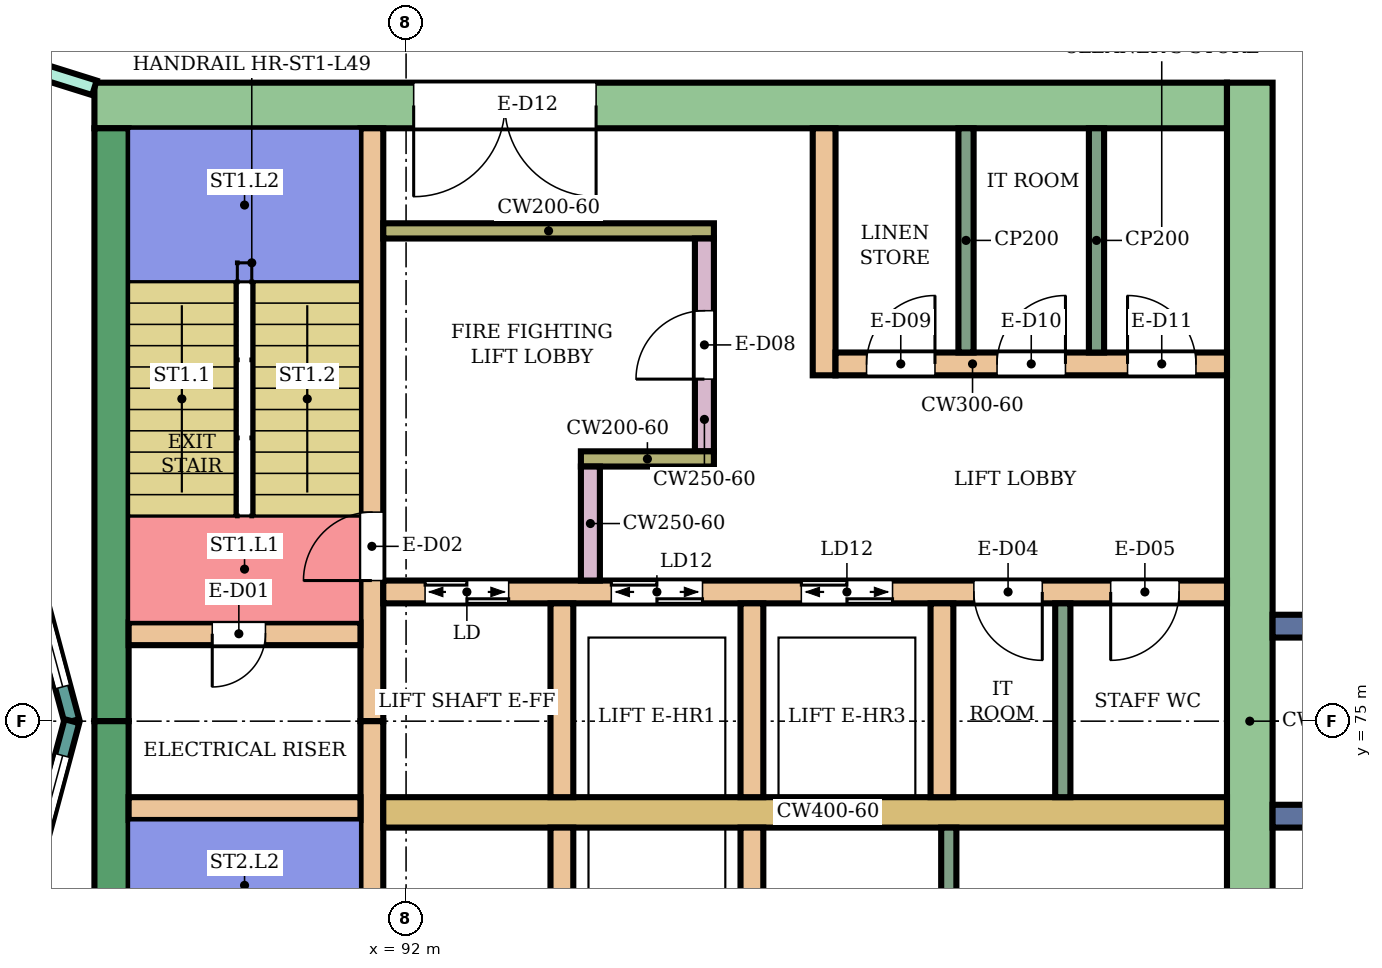
"""IFC4 building model, lengths in metres.
Left out: names, types, materials, properties, quantities, classifications, styles, units other than length and angle.
Written with IfcOpenShell. Run it as: python <this file> out.ifc"""

import sys

from ifc_helpers import new_model, si_unit, direction, frame, frame_2d, origin, place, context, subcontext, project, spatial, rectangle, extrude, element, fill, save


model = new_model("IFC4")
c1 = context("Model", 3, precision=1e-05, world=origin(), true_north=direction((0.0, 1.0)))
c2 = subcontext(c1, "Body", "Model", "MODEL_VIEW")
j1 = project(units=[si_unit("LENGTHUNIT", "METRE"), si_unit("PLANEANGLEUNIT", "RADIAN")], contexts=[c1])
p1 = place(None, origin())
s1 = spatial("IfcSite", under=j1, at=p1, CompositionType="ELEMENT")
p2 = place(p1, origin())
s2 = spatial("IfcBuilding", under=s1, at=p2, CompositionType="ELEMENT")
p3 = place(p2, frame((0.0, 0.0, 212.5)))
s3 = spatial("IfcBuildingStorey", under=s2, at=p3, CompositionType="ELEMENT", Elevation=212.5)
p4 = place(p3, frame((87.9, 83.1, 0.0), z_axis=(0.0, 0.0, 1.0), x_axis=(1.0, 0.0, 0.0)))
e1 = element("IfcWall", 1, at=p4, inside=s3, PredefinedType="SHEAR", context=c2, shape_type="SweptSolid", body=[
    extrude(rectangle(XDim=14.9, YDim=0.6, at=frame_2d((7.45, 0.0))), origin(), (0.0, 0.0, 1.0), 3.88),
])
p5 = place(p4, frame((4.2, 0.0, 0.0)))
e2 = element("IfcOpeningElement", 2, at=p5, cuts=e1, PredefinedType="OPENING", context=c2, shape_type="SweptSolid", body=[
    extrude(rectangle(XDim=2.4, YDim=2.4, at=frame_2d((1.2, 1.2))), frame((0.0, 0.31, 0.0), z_axis=(0.0, -1.0, 0.0), x_axis=(1.0, 0.0, 0.0)), (0.0, 0.0, 1.0), 0.62),
])
for number, where, z_axis, x_axis in (
    (3, (88.125, 75.0, 0.0), (0.0, 0.0, 1.0), (0.0, 1.0, 0.0)),
    (4, (88.125, 67.2, 0.0), (0.0, 0.0, 1.0), (0.0, 1.0, 0.0)),
):
    element("IfcWall", number, at=place(p3, frame(where, z_axis=z_axis, x_axis=x_axis)), inside=s3, PredefinedType="SHEAR", context=c2, shape_type="SweptSolid", body=[
        extrude(rectangle(XDim=7.8, YDim=0.45, at=frame_2d((3.9, 0.0))), origin(), (0.0, 0.0, 1.0), 3.88),
    ])
p6 = place(p3, frame((103.1, 66.6, 0.0), z_axis=(0.0, 0.0, 1.0), x_axis=(0.0, 1.0, 0.0)))
e5 = element("IfcWall", 5, at=p6, inside=s3, PredefinedType="SHEAR", context=c2, shape_type="SweptSolid", body=[
    extrude(rectangle(XDim=16.8, YDim=0.6, at=frame_2d((8.4, 0.0))), origin(), (0.0, 0.0, 1.0), 3.88),
])
p7 = place(p3, frame((91.55, 75.0, 0.0), z_axis=(0.0, 0.0, 1.0), x_axis=(0.0, 1.0, 0.0)))
e6 = element("IfcWall", 6, at=p7, inside=s3, PredefinedType="SHEAR", context=c2, shape_type="SweptSolid", body=[
    extrude(rectangle(XDim=7.8, YDim=0.3, at=frame_2d((3.9, 0.0))), origin(), (0.0, 0.0, 1.0), 3.88),
])
p8 = place(p7, frame((1.85, 0.0, 0.0)))
e7 = element("IfcOpeningElement", 7, at=p8, cuts=e6, PredefinedType="OPENING", context=c2, shape_type="SweptSolid", body=[
    extrude(rectangle(XDim=0.9, YDim=2.1, at=frame_2d((0.45, 1.05))), frame((0.0, 0.16, 0.0), z_axis=(0.0, -1.0, 0.0), x_axis=(1.0, 0.0, 0.0)), (0.0, 0.0, 1.0), 0.32),
])
p9 = place(p3, frame((91.55, 67.2, 0.0), z_axis=(0.0, 0.0, 1.0), x_axis=(0.0, 1.0, 0.0)))
e8 = element("IfcWall", 8, at=p9, inside=s3, PredefinedType="SHEAR", context=c2, shape_type="SweptSolid", body=[
    extrude(rectangle(XDim=7.8, YDim=0.3, at=frame_2d((3.9, 0.0))), origin(), (0.0, 0.0, 1.0), 3.88),
])
p10 = place(p9, frame((0.45, 0.0, 0.0)))
e9 = element("IfcOpeningElement", 9, at=p10, cuts=e8, PredefinedType="OPENING", context=c2, shape_type="SweptSolid", body=[
    extrude(rectangle(XDim=0.9, YDim=2.1, at=frame_2d((0.45, 1.05))), frame((0.0, 0.16, 0.0), z_axis=(0.0, -1.0, 0.0), x_axis=(1.0, 0.0, 0.0)), (0.0, 0.0, 1.0), 0.32),
])
p11 = place(p3, frame((88.35, 76.15, 0.0), z_axis=(0.0, 0.0, 1.0), x_axis=(1.0, 0.0, 0.0)))
e10 = element("IfcWall", 10, at=p11, inside=s3, PredefinedType="SHEAR", context=c2, shape_type="SweptSolid", body=[
    extrude(rectangle(XDim=3.05, YDim=0.3, at=frame_2d((1.525, 0.0))), origin(), (0.0, 0.0, 1.0), 3.88),
])
p12 = place(p11, frame((1.1, 0.0, 0.0)))
e11 = element("IfcOpeningElement", 11, at=p12, cuts=e10, PredefinedType="OPENING", context=c2, shape_type="SweptSolid", body=[
    extrude(rectangle(XDim=0.7, YDim=2.0, at=frame_2d((0.35, 1.0))), frame((0.0, 0.16, 0.0), z_axis=(0.0, -1.0, 0.0), x_axis=(1.0, 0.0, 0.0)), (0.0, 0.0, 1.0), 0.32),
])
p13 = place(p3, frame((88.35, 73.85, 0.0), z_axis=(0.0, 0.0, 1.0), x_axis=(1.0, 0.0, 0.0)))
e12 = element("IfcWall", 12, at=p13, inside=s3, PredefinedType="SHEAR", context=c2, shape_type="SweptSolid", body=[
    extrude(rectangle(XDim=3.05, YDim=0.3, at=frame_2d((1.525, 0.0))), origin(), (0.0, 0.0, 1.0), 3.88),
])
p14 = place(p3, frame((91.7, 76.7, 0.0), z_axis=(0.0, 0.0, 1.0), x_axis=(1.0, 0.0, 0.0)))
e13 = element("IfcWall", 13, at=p14, inside=s3, PredefinedType="SHEAR", context=c2, shape_type="SweptSolid", body=[
    extrude(rectangle(XDim=11.1, YDim=0.3, at=frame_2d((5.55, 0.0))), origin(), (0.0, 0.0, 1.0), 3.88),
])
p15 = place(p14, frame((0.55, 0.0, 0.0)))
e14 = element("IfcOpeningElement", 14, at=p15, cuts=e13, PredefinedType="OPENING", context=c2, shape_type="SweptSolid", body=[
    extrude(rectangle(XDim=1.1, YDim=2.1, at=frame_2d((0.55, 1.05))), frame((0.0, 0.16, 0.0), z_axis=(0.0, -1.0, 0.0), x_axis=(1.0, 0.0, 0.0)), (0.0, 0.0, 1.0), 0.32),
])
p16 = place(p14, frame((3.0, 0.0, 0.0)))
e15 = element("IfcOpeningElement", 15, at=p16, cuts=e13, PredefinedType="OPENING", context=c2, shape_type="SweptSolid", body=[
    extrude(rectangle(XDim=1.2, YDim=2.1, at=frame_2d((0.6, 1.05))), frame((0.0, 0.16, 0.0), z_axis=(0.0, -1.0, 0.0), x_axis=(1.0, 0.0, 0.0)), (0.0, 0.0, 1.0), 0.32),
])
p17 = place(p14, frame((5.5, 0.0, 0.0)))
e16 = element("IfcOpeningElement", 16, at=p17, cuts=e13, PredefinedType="OPENING", context=c2, shape_type="SweptSolid", body=[
    extrude(rectangle(XDim=1.2, YDim=2.1, at=frame_2d((0.6, 1.05))), frame((0.0, 0.16, 0.0), z_axis=(0.0, -1.0, 0.0), x_axis=(1.0, 0.0, 0.0)), (0.0, 0.0, 1.0), 0.32),
])
p18 = place(p14, frame((7.77, 0.0, 0.0)))
e17 = element("IfcOpeningElement", 17, at=p18, cuts=e13, PredefinedType="OPENING", context=c2, shape_type="SweptSolid", body=[
    extrude(rectangle(XDim=0.9, YDim=2.1, at=frame_2d((0.45, 1.05))), frame((0.0, 0.16, 0.0), z_axis=(0.0, -1.0, 0.0), x_axis=(1.0, 0.0, 0.0)), (0.0, 0.0, 1.0), 0.32),
])
p19 = place(p14, frame((9.57, 0.0, 0.0)))
e18 = element("IfcOpeningElement", 18, at=p19, cuts=e13, PredefinedType="OPENING", context=c2, shape_type="SweptSolid", body=[
    extrude(rectangle(XDim=0.9, YDim=2.1, at=frame_2d((0.45, 1.05))), frame((0.0, 0.16, 0.0), z_axis=(0.0, -1.0, 0.0), x_axis=(1.0, 0.0, 0.0)), (0.0, 0.0, 1.0), 0.32),
])
p20 = place(p3, frame((91.7, 73.8, 0.0), z_axis=(0.0, 0.0, 1.0), x_axis=(1.0, 0.0, 0.0)))
e19 = element("IfcWall", 19, at=p20, inside=s3, PredefinedType="SHEAR", context=c2, shape_type="SweptSolid", body=[
    extrude(rectangle(XDim=11.1, YDim=0.4, at=frame_2d((5.55, 0.0))), origin(), (0.0, 0.0, 1.0), 3.88),
])
for number, where, z_axis, x_axis in (
    (20, (94.05, 74.0, 0.0), (0.0, 0.0, 1.0), (0.0, 1.0, 0.0)),
    (21, (96.55, 74.0, 0.0), (0.0, 0.0, 1.0), (0.0, 1.0, 0.0)),
    (22, (99.05, 74.0, 0.0), (0.0, 0.0, 1.0), (0.0, 1.0, 0.0)),
    (23, (94.05, 71.05, 0.0), (0.0, 0.0, 1.0), (0.0, 1.0, 0.0)),
    (24, (96.55, 71.05, 0.0), (0.0, 0.0, 1.0), (0.0, 1.0, 0.0)),
):
    element("IfcWall", number, at=place(p3, frame(where, z_axis=z_axis, x_axis=x_axis)), inside=s3, PredefinedType="SHEAR", context=c2, shape_type="SweptSolid", body=[
        extrude(rectangle(XDim=2.55, YDim=0.3, at=frame_2d((1.275, 0.0))), origin(), (0.0, 0.0, 1.0), 3.88),
    ])
p21 = place(p3, frame((91.7, 81.45, 0.0), z_axis=(0.0, 0.0, 1.0), x_axis=(1.0, 0.0, 0.0)))
e25 = element("IfcWall", 25, at=p21, inside=s3, PredefinedType="SHEAR", context=c2, shape_type="SweptSolid", body=[
    extrude(rectangle(XDim=4.35, YDim=0.2, at=frame_2d((2.175, 0.0))), origin(), (0.0, 0.0, 1.0), 3.88),
])
p22 = place(p3, frame((95.925, 78.55, 0.0), z_axis=(0.0, 0.0, 1.0), x_axis=(0.0, 1.0, 0.0)))
e26 = element("IfcWall", 26, at=p22, inside=s3, PredefinedType="SHEAR", context=c2, shape_type="SweptSolid", body=[
    extrude(rectangle(XDim=2.8, YDim=0.25, at=frame_2d((1.4, 0.0))), origin(), (0.0, 0.0, 1.0), 3.88),
])
p23 = place(p22, frame((0.95, 0.0, 0.0)))
e27 = element("IfcOpeningElement", 27, at=p23, cuts=e26, PredefinedType="OPENING", context=c2, shape_type="SweptSolid", body=[
    extrude(rectangle(XDim=0.9, YDim=2.1, at=frame_2d((0.45, 1.05))), frame((0.0, 0.135, 0.0), z_axis=(0.0, -1.0, 0.0), x_axis=(1.0, 0.0, 0.0)), (0.0, 0.0, 1.0), 0.27),
])
p24 = place(p3, frame((94.3, 78.45, 0.0), z_axis=(0.0, 0.0, 1.0), x_axis=(1.0, 0.0, 0.0)))
e28 = element("IfcWall", 28, at=p24, inside=s3, PredefinedType="SHEAR", context=c2, shape_type="SweptSolid", body=[
    extrude(rectangle(XDim=1.75, YDim=0.2, at=frame_2d((0.875, 0.0))), origin(), (0.0, 0.0, 1.0), 3.88),
])
p25 = place(p3, frame((94.425, 76.85, 0.0), z_axis=(0.0, 0.0, 1.0), x_axis=(0.0, 1.0, 0.0)))
e29 = element("IfcWall", 29, at=p25, inside=s3, PredefinedType="SHEAR", context=c2, shape_type="SweptSolid", body=[
    extrude(rectangle(XDim=1.5, YDim=0.25, at=frame_2d((0.75, 0.0))), origin(), (0.0, 0.0, 1.0), 3.88),
])
p26 = place(p3, frame((97.5, 79.55, 0.0), z_axis=(0.0, 0.0, 1.0), x_axis=(0.0, 1.0, 0.0)))
e30 = element("IfcWall", 30, at=p26, inside=s3, PredefinedType="SHEAR", context=c2, shape_type="SweptSolid", body=[
    extrude(rectangle(XDim=3.25, YDim=0.3, at=frame_2d((1.625, 0.0))), origin(), (0.0, 0.0, 1.0), 3.88),
])
p27 = place(p3, frame((97.65, 79.7, 0.0), z_axis=(0.0, 0.0, 1.0), x_axis=(1.0, 0.0, 0.0)))
e31 = element("IfcWall", 31, at=p27, inside=s3, PredefinedType="SHEAR", context=c2, shape_type="SweptSolid", body=[
    extrude(rectangle(XDim=5.15, YDim=0.3, at=frame_2d((2.575, 0.0))), origin(), (0.0, 0.0, 1.0), 3.88),
])
p28 = place(p27, frame((0.408, 0.0, 0.0)))
e32 = element("IfcOpeningElement", 32, at=p28, cuts=e31, PredefinedType="OPENING", context=c2, shape_type="SweptSolid", body=[
    extrude(rectangle(XDim=0.9, YDim=2.1, at=frame_2d((0.45, 1.05))), frame((0.0, 0.16, 0.0), z_axis=(0.0, -1.0, 0.0), x_axis=(1.0, 0.0, 0.0)), (0.0, 0.0, 1.0), 0.32),
])
p29 = place(p27, frame((2.125, 0.0, 0.0)))
e33 = element("IfcOpeningElement", 33, at=p29, cuts=e31, PredefinedType="OPENING", context=c2, shape_type="SweptSolid", body=[
    extrude(rectangle(XDim=0.9, YDim=2.1, at=frame_2d((0.45, 1.05))), frame((0.0, 0.16, 0.0), z_axis=(0.0, -1.0, 0.0), x_axis=(1.0, 0.0, 0.0)), (0.0, 0.0, 1.0), 0.32),
])
p30 = place(p27, frame((3.842, 0.0, 0.0)))
e34 = element("IfcOpeningElement", 34, at=p30, cuts=e31, PredefinedType="OPENING", context=c2, shape_type="SweptSolid", body=[
    extrude(rectangle(XDim=0.9, YDim=2.1, at=frame_2d((0.45, 1.05))), frame((0.0, 0.16, 0.0), z_axis=(0.0, -1.0, 0.0), x_axis=(1.0, 0.0, 0.0)), (0.0, 0.0, 1.0), 0.32),
])
for number, where, z_axis, x_axis in (
    (35, (103.4, 73.75, 0.0), (0.0, 0.0, 1.0), (1.0, 0.0, 0.0)),
    (36, (103.4, 76.25, 0.0), (0.0, 0.0, 1.0), (1.0, 0.0, 0.0)),
):
    element("IfcWall", number, at=place(p3, frame(where, z_axis=z_axis, x_axis=x_axis)), inside=s3, PredefinedType="NOTDEFINED", context=c2, shape_type="SweptSolid", body=[
        extrude(rectangle(XDim=2.416, YDim=0.3, at=frame_2d((1.208, 0.0))), origin(), (0.0, 0.0, 1.0), 4.2),
    ])
p31 = place(p3, frame((87.604, 75.0, 0.0), z_axis=(0.0, 0.0, 1.0), x_axis=(-0.258789828301, 0.965933654434, 0.0)))
e37 = element("IfcWall", 37, at=p31, inside=s3, PredefinedType="NOTDEFINED", context=c2, shape_type="SweptSolid", body=[
    extrude(rectangle(XDim=3.936, YDim=0.2, at=frame_2d((1.968, 0.0))), origin(), (0.0, 0.0, 1.0), 4.2),
])
p32 = place(p31, frame((0.468, 0.0, 0.9)))
e38 = element("IfcOpeningElement", 38, at=p32, cuts=e37, PredefinedType="OPENING", context=c2, shape_type="SweptSolid", body=[
    extrude(rectangle(XDim=3.0, YDim=2.3, at=frame_2d((1.5, 1.15))), frame((0.0, 0.11, 0.0), z_axis=(0.0, -1.0, 0.0), x_axis=(1.0, 0.0, 0.0)), (0.0, 0.0, 1.0), 0.22),
])
p33 = place(p3, frame((86.585, 71.198, 0.0), z_axis=(0.0, 0.0, 1.0), x_axis=(0.258789828301, 0.965933654434, 0.0)))
e39 = element("IfcWall", 39, at=p33, inside=s3, PredefinedType="NOTDEFINED", context=c2, shape_type="SweptSolid", body=[
    extrude(rectangle(XDim=3.936, YDim=0.2, at=frame_2d((1.968, 0.0))), origin(), (0.0, 0.0, 1.0), 4.2),
])
p34 = place(p33, frame((0.468, 0.0, 0.9)))
e40 = element("IfcOpeningElement", 40, at=p34, cuts=e39, PredefinedType="OPENING", context=c2, shape_type="SweptSolid", body=[
    extrude(rectangle(XDim=3.0, YDim=2.3, at=frame_2d((1.5, 1.15))), frame((0.0, 0.11, 0.0), z_axis=(0.0, -1.0, 0.0), x_axis=(1.0, 0.0, 0.0)), (0.0, 0.0, 1.0), 0.22),
])
p35 = place(p3, frame((85.587, 84.057, 0.0), z_axis=(0.0, 0.0, 1.0), x_axis=(0.954239513179, -0.299043393987, 0.0)))
e41 = element("IfcWall", 41, at=p35, inside=s3, PredefinedType="PARTITIONING", context=c2, shape_type="SweptSolid", body=[
    extrude(rectangle(XDim=2.424, YDim=0.2, at=frame_2d((1.212, 0.0))), origin(), (0.0, 0.0, 1.0), 3.75),
])
p36 = place(p35, frame((0.762, 0.0, 0.0)))
e42 = element("IfcOpeningElement", 42, at=p36, cuts=e41, PredefinedType="OPENING", context=c2, shape_type="SweptSolid", body=[
    extrude(rectangle(XDim=0.9, YDim=2.1, at=frame_2d((0.45, 1.05))), frame((0.0, 0.11, 0.0), z_axis=(0.0, -1.0, 0.0), x_axis=(1.0, 0.0, 0.0)), (0.0, 0.0, 1.0), 0.22),
])
for number, where, z_axis, x_axis in (
    (43, (100.64, 74.0, 0.0), (0.0, 0.0, 1.0), (0.0, 1.0, 0.0)),
    (44, (99.14, 71.05, 0.0), (0.0, 0.0, 1.0), (0.0, 1.0, 0.0)),
):
    element("IfcWall", number, at=place(p3, frame(where, z_axis=z_axis, x_axis=x_axis)), inside=s3, PredefinedType="PARTITIONING", context=c2, shape_type="SweptSolid", body=[
        extrude(rectangle(XDim=2.55, YDim=0.2, at=frame_2d((1.275, 0.0))), origin(), (0.0, 0.0, 1.0), 3.88),
    ])
for number, where, z_axis, x_axis in (
    (45, (99.367, 79.85, 0.0), (0.0, 0.0, 1.0), (0.0, 1.0, 0.0)),
    (46, (101.083, 79.85, 0.0), (0.0, 0.0, 1.0), (0.0, 1.0, 0.0)),
):
    element("IfcWall", number, at=place(p3, frame(where, z_axis=z_axis, x_axis=x_axis)), inside=s3, PredefinedType="PARTITIONING", context=c2, shape_type="SweptSolid", body=[
        extrude(rectangle(XDim=2.95, YDim=0.2, at=frame_2d((1.475, 0.0))), origin(), (0.0, 0.0, 1.0), 3.88),
    ])
p37 = place(p32, origin())
e47 = element("IfcWindow", 47, at=p37, inside=s3, PartitioningType="SINGLE_PANEL", PredefinedType="WINDOW", context=c2, shape_type="SweptSolid", body=[
    extrude(rectangle(XDim=3.0, YDim=2.3, at=frame_2d((1.5, 1.15))), frame((0.0, 0.03, 0.0), z_axis=(0.0, -1.0, 0.0), x_axis=(1.0, 0.0, 0.0)), (0.0, 0.0, 1.0), 0.06),
])
fill(e38, e47)
p38 = place(p34, origin())
e48 = element("IfcWindow", 48, at=p38, inside=s3, PartitioningType="SINGLE_PANEL", PredefinedType="WINDOW", context=c2, shape_type="SweptSolid", body=[
    extrude(rectangle(XDim=3.0, YDim=2.3, at=frame_2d((1.5, 1.15))), frame((0.0, 0.03, 0.0), z_axis=(0.0, -1.0, 0.0), x_axis=(1.0, 0.0, 0.0)), (0.0, 0.0, 1.0), 0.06),
])
fill(e40, e48)
p39 = place(p12, frame((0.7, 0.0, 0.0), z_axis=(0.0, 0.0, 1.0), x_axis=(-1.0, 0.0, 0.0)))
e49 = element("IfcDoor", 49, at=p39, inside=s3, OperationType="SINGLE_SWING_RIGHT", PredefinedType="DOOR", context=c2, shape_type="SweptSolid", body=[
    extrude(rectangle(XDim=0.7, YDim=2.0, at=frame_2d((0.35, 1.0))), frame((0.0, 0.025, 0.0), z_axis=(0.0, -1.0, 0.0), x_axis=(1.0, 0.0, 0.0)), (0.0, 0.0, 1.0), 0.05),
])
fill(e11, e49)
p40 = place(p8, origin())
e50 = element("IfcDoor", 50, at=p40, inside=s3, OperationType="SINGLE_SWING_LEFT", PredefinedType="DOOR", context=c2, shape_type="SweptSolid", body=[
    extrude(rectangle(XDim=0.9, YDim=2.1, at=frame_2d((0.45, 1.05))), frame((0.0, 0.025, 0.0), z_axis=(0.0, -1.0, 0.0), x_axis=(1.0, 0.0, 0.0)), (0.0, 0.0, 1.0), 0.05),
])
fill(e7, e50)
p41 = place(p15, origin())
e51 = element("IfcDoor", 51, at=p41, inside=s3, OperationType="DOUBLE_DOOR_SLIDING", PredefinedType="DOOR", context=c2, shape_type="SweptSolid", body=[
    extrude(rectangle(XDim=1.1, YDim=2.1, at=frame_2d((0.55, 1.05))), frame((0.0, 0.025, 0.0), z_axis=(0.0, -1.0, 0.0), x_axis=(1.0, 0.0, 0.0)), (0.0, 0.0, 1.0), 0.05),
])
fill(e14, e51)
p42 = place(p16, origin())
e52 = element("IfcDoor", 52, at=p42, inside=s3, OperationType="DOUBLE_DOOR_SLIDING", PredefinedType="DOOR", context=c2, shape_type="SweptSolid", body=[
    extrude(rectangle(XDim=1.2, YDim=2.1, at=frame_2d((0.6, 1.05))), frame((0.0, 0.025, 0.0), z_axis=(0.0, -1.0, 0.0), x_axis=(1.0, 0.0, 0.0)), (0.0, 0.0, 1.0), 0.05),
])
fill(e15, e52)
p43 = place(p17, origin())
e53 = element("IfcDoor", 53, at=p43, inside=s3, OperationType="DOUBLE_DOOR_SLIDING", PredefinedType="DOOR", context=c2, shape_type="SweptSolid", body=[
    extrude(rectangle(XDim=1.2, YDim=2.1, at=frame_2d((0.6, 1.05))), frame((0.0, 0.025, 0.0), z_axis=(0.0, -1.0, 0.0), x_axis=(1.0, 0.0, 0.0)), (0.0, 0.0, 1.0), 0.05),
])
fill(e16, e53)
p44 = place(p18, frame((0.9, 0.0, 0.0), z_axis=(0.0, 0.0, 1.0), x_axis=(-1.0, 0.0, 0.0)))
e54 = element("IfcDoor", 54, at=p44, inside=s3, OperationType="SINGLE_SWING_LEFT", PredefinedType="DOOR", context=c2, shape_type="SweptSolid", body=[
    extrude(rectangle(XDim=0.9, YDim=2.1, at=frame_2d((0.45, 1.05))), frame((0.0, 0.025, 0.0), z_axis=(0.0, -1.0, 0.0), x_axis=(1.0, 0.0, 0.0)), (0.0, 0.0, 1.0), 0.05),
])
fill(e17, e54)
p45 = place(p19, frame((0.9, 0.0, 0.0), z_axis=(0.0, 0.0, 1.0), x_axis=(-1.0, 0.0, 0.0)))
e55 = element("IfcDoor", 55, at=p45, inside=s3, OperationType="SINGLE_SWING_RIGHT", PredefinedType="DOOR", context=c2, shape_type="SweptSolid", body=[
    extrude(rectangle(XDim=0.9, YDim=2.1, at=frame_2d((0.45, 1.05))), frame((0.0, 0.025, 0.0), z_axis=(0.0, -1.0, 0.0), x_axis=(1.0, 0.0, 0.0)), (0.0, 0.0, 1.0), 0.05),
])
fill(e18, e55)
p46 = place(p23, origin())
e56 = element("IfcDoor", 56, at=p46, inside=s3, OperationType="SINGLE_SWING_LEFT", PredefinedType="DOOR", context=c2, shape_type="SweptSolid", body=[
    extrude(rectangle(XDim=0.9, YDim=2.1, at=frame_2d((0.45, 1.05))), frame((0.0, 0.025, 0.0), z_axis=(0.0, -1.0, 0.0), x_axis=(1.0, 0.0, 0.0)), (0.0, 0.0, 1.0), 0.05),
])
fill(e27, e56)
p47 = place(p28, origin())
e57 = element("IfcDoor", 57, at=p47, inside=s3, OperationType="SINGLE_SWING_RIGHT", PredefinedType="DOOR", context=c2, shape_type="SweptSolid", body=[
    extrude(rectangle(XDim=0.9, YDim=2.1, at=frame_2d((0.45, 1.05))), frame((0.0, 0.025, 0.0), z_axis=(0.0, -1.0, 0.0), x_axis=(1.0, 0.0, 0.0)), (0.0, 0.0, 1.0), 0.05),
])
fill(e32, e57)
p48 = place(p29, origin())
e58 = element("IfcDoor", 58, at=p48, inside=s3, OperationType="SINGLE_SWING_RIGHT", PredefinedType="DOOR", context=c2, shape_type="SweptSolid", body=[
    extrude(rectangle(XDim=0.9, YDim=2.1, at=frame_2d((0.45, 1.05))), frame((0.0, 0.025, 0.0), z_axis=(0.0, -1.0, 0.0), x_axis=(1.0, 0.0, 0.0)), (0.0, 0.0, 1.0), 0.05),
])
fill(e33, e58)
p49 = place(p30, origin())
e59 = element("IfcDoor", 59, at=p49, inside=s3, OperationType="SINGLE_SWING_LEFT", PredefinedType="DOOR", context=c2, shape_type="SweptSolid", body=[
    extrude(rectangle(XDim=0.9, YDim=2.1, at=frame_2d((0.45, 1.05))), frame((0.0, 0.025, 0.0), z_axis=(0.0, -1.0, 0.0), x_axis=(1.0, 0.0, 0.0)), (0.0, 0.0, 1.0), 0.05),
])
fill(e34, e59)
p50 = place(p5, frame((2.4, 0.0, 0.0), z_axis=(0.0, 0.0, 1.0), x_axis=(-1.0, 0.0, 0.0)))
e60 = element("IfcDoor", 60, at=p50, inside=s3, OperationType="DOUBLE_DOOR_SINGLE_SWING", PredefinedType="DOOR", context=c2, shape_type="SweptSolid", body=[
    extrude(rectangle(XDim=2.4, YDim=2.4, at=frame_2d((1.2, 1.2))), frame((0.0, 0.025, 0.0), z_axis=(0.0, -1.0, 0.0), x_axis=(1.0, 0.0, 0.0)), (0.0, 0.0, 1.0), 0.05),
])
fill(e2, e60)
save(model, sys.argv[1])
